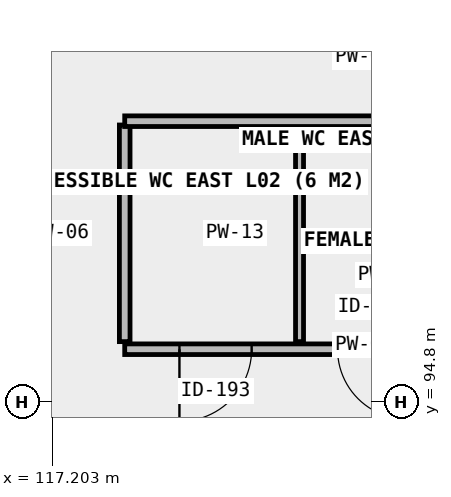
"""IFC4 building model, lengths in metres.
Left out: names, types, materials, properties, quantities, classifications, styles, units other than length and angle.
Written with IfcOpenShell. Run it as: python <this file> out.ifc"""

import sys

from ifc_helpers import new_model, si_unit, direction, frame, frame_2d, origin, place, context, subcontext, project, spatial, rectangle, extrude, element, fill, save


model = new_model("IFC4")
c1 = context("Model", 3, precision=1e-05, world=origin(), true_north=direction((0.0, 1.0)))
c2 = subcontext(c1, "Body", "Model", "MODEL_VIEW")
j1 = project(units=[si_unit("LENGTHUNIT", "METRE"), si_unit("PLANEANGLEUNIT", "RADIAN")], contexts=[c1])
p1 = place(None, origin())
s1 = spatial("IfcSite", under=j1, at=p1, CompositionType="ELEMENT")
p2 = place(p1, origin())
s2 = spatial("IfcBuilding", under=s1, at=p2, CompositionType="ELEMENT")
p3 = place(p2, frame((0.0, 0.0, 8.4)))
s3 = spatial("IfcBuildingStorey", under=s2, at=p3, CompositionType="ELEMENT", Elevation=8.4)
p4 = place(p3, frame((118.15, 95.5, 0.0), z_axis=(0.0, 0.0, 1.0), x_axis=(1.0, 0.0, 0.0)))
e1 = element("IfcWall", 1, at=p4, inside=s3, PredefinedType="PLUMBINGWALL", context=c2, shape_type="SweptSolid", body=[
    extrude(rectangle(XDim=6.3, YDim=0.14, at=frame_2d((3.15, 0.0))), origin(), (0.0, 0.0, 1.0), 5.12),
])
p5 = place(p4, frame((0.72, 0.0, 0.0)))
e2 = element("IfcOpeningElement", 2, at=p5, cuts=e1, PredefinedType="OPENING", context=c2, shape_type="SweptSolid", body=[
    extrude(rectangle(XDim=0.95, YDim=2.1, at=frame_2d((0.475, 1.05))), frame((0.0, 0.08, 0.0), z_axis=(0.0, -1.0, 0.0), x_axis=(1.0, 0.0, 0.0)), (0.0, 0.0, 1.0), 0.16),
])
p6 = place(p4, frame((2.8, 0.0, 0.0)))
e3 = element("IfcOpeningElement", 3, at=p6, cuts=e1, PredefinedType="OPENING", context=c2, shape_type="SweptSolid", body=[
    extrude(rectangle(XDim=0.92, YDim=2.1, at=frame_2d((0.46, 1.05))), frame((0.0, 0.08, 0.0), z_axis=(0.0, -1.0, 0.0), x_axis=(1.0, 0.0, 0.0)), (0.0, 0.0, 1.0), 0.16),
])
p7 = place(p4, frame((4.8, 0.0, 0.0)))
e4 = element("IfcOpeningElement", 4, at=p7, cuts=e1, PredefinedType="OPENING", context=c2, shape_type="SweptSolid", body=[
    extrude(rectangle(XDim=0.92, YDim=2.1, at=frame_2d((0.46, 1.05))), frame((0.0, 0.08, 0.0), z_axis=(0.0, -1.0, 0.0), x_axis=(1.0, 0.0, 0.0)), (0.0, 0.0, 1.0), 0.16),
])
p8 = place(p3, frame((118.15, 95.6, 0.0), z_axis=(0.0, 0.0, 1.0), x_axis=(0.0, 1.0, 0.0)))
e5 = element("IfcWall", 5, at=p8, inside=s3, PredefinedType="PLUMBINGWALL", context=c2, shape_type="SweptSolid", body=[
    extrude(rectangle(XDim=2.85, YDim=0.14, at=frame_2d((1.425, 0.0))), origin(), (0.0, 0.0, 1.0), 5.12),
])
p9 = place(p3, frame((120.45, 95.6, 0.0), z_axis=(0.0, 0.0, 1.0), x_axis=(0.0, 1.0, 0.0)))
e6 = element("IfcWall", 6, at=p9, inside=s3, PredefinedType="PARTITIONING", context=c2, shape_type="SweptSolid", body=[
    extrude(rectangle(XDim=2.85, YDim=0.105, at=frame_2d((1.425, 0.0))), origin(), (0.0, 0.0, 1.0), 5.12),
])
p10 = place(p3, frame((118.15, 98.5, 0.0), z_axis=(0.0, 0.0, 1.0), x_axis=(1.0, 0.0, 0.0)))
e7 = element("IfcWall", 7, at=p10, inside=s3, PredefinedType="PLUMBINGWALL", context=c2, shape_type="SweptSolid", body=[
    extrude(rectangle(XDim=6.3, YDim=0.14, at=frame_2d((3.15, 0.0))), origin(), (0.0, 0.0, 1.0), 5.12),
])
p11 = place(p5, frame((0.475, 0.0, 0.0), z_axis=(0.0, 0.0, 1.0), x_axis=(-1.0, 0.0, 0.0)))
e8 = element("IfcDoor", 8, at=p11, inside=s3, OperationType="SINGLE_SWING_LEFT", PredefinedType="DOOR", context=c2, shape_type="SweptSolid", body=[
    extrude(rectangle(XDim=0.95, YDim=2.1, at=frame_2d((0.0, 1.05))), frame((0.0, 0.025, 0.0), z_axis=(0.0, -1.0, 0.0), x_axis=(1.0, 0.0, 0.0)), (0.0, 0.0, 1.0), 0.05),
])
fill(e2, e8)
p12 = place(p6, origin())
e9 = element("IfcDoor", 9, at=p12, inside=s3, OperationType="SINGLE_SWING_RIGHT", PredefinedType="DOOR", context=c2, shape_type="SweptSolid", body=[
    extrude(rectangle(XDim=0.92, YDim=2.1, at=frame_2d((0.46, 1.05))), frame((0.0, 0.025, 0.0), z_axis=(0.0, -1.0, 0.0), x_axis=(1.0, 0.0, 0.0)), (0.0, 0.0, 1.0), 0.05),
])
fill(e3, e9)
save(model, sys.argv[1])
